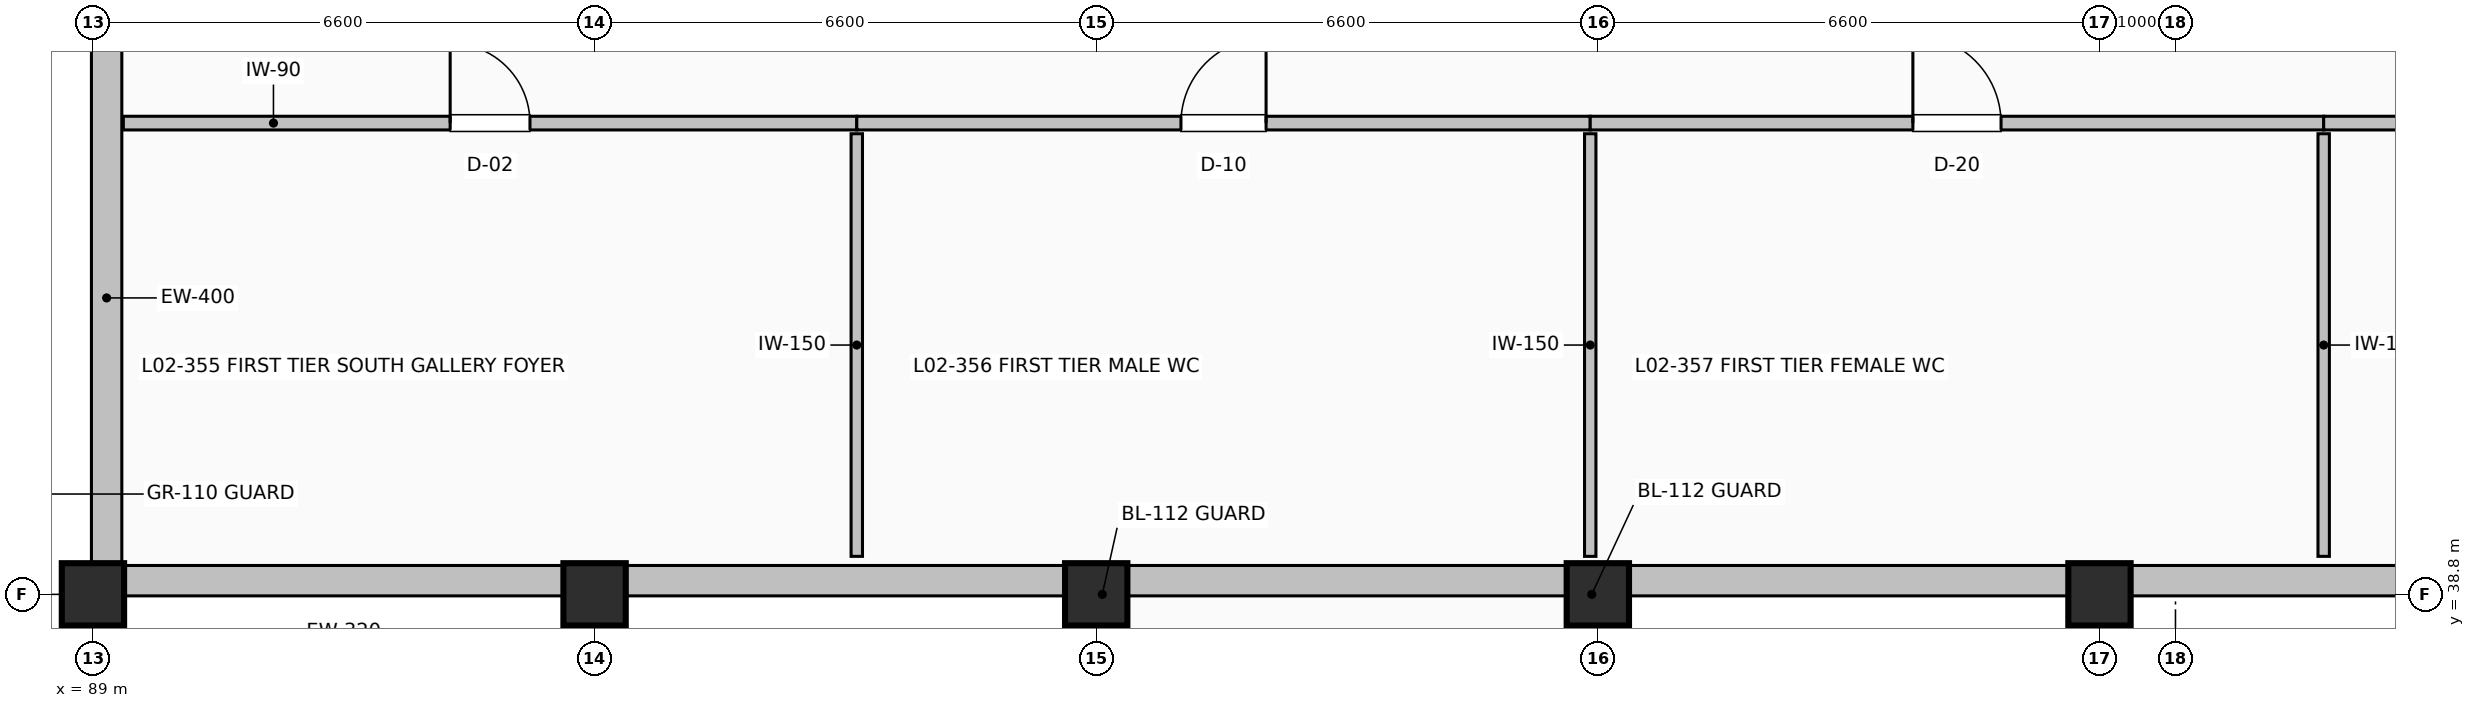
"""IFC4 building model, lengths in metres.
Left out: names, types, materials, properties, quantities, classifications, styles, units other than length and angle.
Written with IfcOpenShell. Run it as: python <this file> out.ifc"""

import sys

from ifc_helpers import new_model, si_unit, direction, frame, frame_2d, origin, origin_2d, place, context, subcontext, project, spatial, rectangle, extrude, element, fill, save


model = new_model("IFC4")
c1 = context("Model", 3, precision=1e-05, world=origin(), true_north=direction((0.0, 1.0)))
c2 = subcontext(c1, "Body", "Model", "MODEL_VIEW")
j1 = project(units=[si_unit("LENGTHUNIT", "METRE"), si_unit("PLANEANGLEUNIT", "RADIAN")], contexts=[c1])
p1 = place(None, origin())
s1 = spatial("IfcSite", under=j1, at=p1, CompositionType="ELEMENT")
p2 = place(p1, origin())
s2 = spatial("IfcBuilding", under=s1, at=p2, CompositionType="ELEMENT")
p3 = place(p2, frame((0.0, 0.0, 10.2)))
s3 = spatial("IfcBuildingStorey", under=s2, at=p3, CompositionType="ELEMENT", Elevation=10.2)
for number, where, z_axis, x_axis in (
    (1, (89.0, 38.8, 0.0), (0.0, 0.0, 1.0), (1.0, 0.0, 0.0)),
    (2, (95.6, 38.8, 0.0), (0.0, 0.0, 1.0), (1.0, 0.0, 0.0)),
    (3, (102.2, 38.8, 0.0), (0.0, 0.0, 1.0), (1.0, 0.0, 0.0)),
    (4, (108.8, 38.8, 0.0), (0.0, 0.0, 1.0), (1.0, 0.0, 0.0)),
    (5, (115.4, 38.8, 0.0), (0.0, 0.0, 1.0), (1.0, 0.0, 0.0)),
):
    element("IfcColumn", number, at=place(p3, frame(where, z_axis=z_axis, x_axis=x_axis)), inside=s3, PredefinedType="COLUMN", context=c2, shape_type="SweptSolid", body=[
        extrude(rectangle(XDim=0.82, YDim=0.82, at=origin_2d()), origin(), (0.0, 0.0, 1.0), 4.8),
    ])
for number, where, z_axis, x_axis in (
    (6, (121.59, 38.98, 0.0), (0.0, 0.0, 1.0), (-1.0, 0.0, 0.0)),
    (7, (114.99, 38.98, 0.0), (0.0, 0.0, 1.0), (-1.0, 0.0, 0.0)),
):
    element("IfcWall", number, at=place(p3, frame(where, z_axis=z_axis, x_axis=x_axis)), inside=s3, PredefinedType="SOLIDWALL", context=c2, shape_type="SweptSolid", body=[
        extrude(rectangle(XDim=5.78, YDim=0.4, at=frame_2d((2.89, 0.0))), origin(), (0.0, 0.0, 1.0), 3.722),
    ])
p4 = place(p3, frame((108.39, 38.98, 0.0), z_axis=(0.0, 0.0, 1.0), x_axis=(-1.0, 0.0, 0.0)))
e8 = element("IfcWall", 8, at=p4, inside=s3, PredefinedType="SOLIDWALL", context=c2, shape_type="SweptSolid", body=[
    extrude(rectangle(XDim=5.78, YDim=0.4, at=frame_2d((2.89, 0.0))), origin(), (0.0, 0.0, 1.0), 3.722),
])
for number, where, z_axis, x_axis in (
    (9, (101.79, 38.98, 0.0), (0.0, 0.0, 1.0), (-1.0, 0.0, 0.0)),
    (10, (95.19, 38.98, 0.0), (0.0, 0.0, 1.0), (-1.0, 0.0, 0.0)),
):
    element("IfcWall", number, at=place(p3, frame(where, z_axis=z_axis, x_axis=x_axis)), inside=s3, PredefinedType="SOLIDWALL", context=c2, shape_type="SweptSolid", body=[
        extrude(rectangle(XDim=5.78, YDim=0.4, at=frame_2d((2.89, 0.0))), origin(), (0.0, 0.0, 1.0), 3.722),
    ])
p5 = place(p3, frame((89.18, 39.21, 0.0), z_axis=(0.0, 0.0, 1.0), x_axis=(0.0, 1.0, 0.0)))
e11 = element("IfcWall", 11, at=p5, inside=s3, PredefinedType="SOLIDWALL", context=c2, shape_type="SweptSolid", body=[
    extrude(rectangle(XDim=6.98, YDim=0.4, at=frame_2d((3.49, 0.0))), origin(), (0.0, 0.0, 1.0), 3.722),
])
p6 = place(p3, frame((89.4, 45.0, 0.0), z_axis=(0.0, 0.0, 1.0), x_axis=(1.0, 0.0, 0.0)))
e12 = element("IfcWall", 12, at=p6, inside=s3, PredefinedType="PARTITIONING", context=c2, shape_type="SweptSolid", body=[
    extrude(rectangle(XDim=9.65, YDim=0.18, at=frame_2d((4.825, 0.0))), origin(), (0.0, 0.0, 1.0), 4.492),
])
p7 = place(p6, frame((4.3, 0.0, 0.0)))
e13 = element("IfcOpeningElement", 13, at=p7, cuts=e12, PredefinedType="OPENING", context=c2, shape_type="SweptSolid", body=[
    extrude(rectangle(XDim=1.05, YDim=2.1, at=frame_2d((0.525, 1.05))), frame((0.0, 0.1, 0.0), z_axis=(0.0, -1.0, 0.0), x_axis=(1.0, 0.0, 0.0)), (0.0, 0.0, 1.0), 0.2),
])
p8 = place(p3, frame((99.05, 39.3, 0.0), z_axis=(0.0, 0.0, 1.0), x_axis=(0.0, 1.0, 0.0)))
e14 = element("IfcWall", 14, at=p8, inside=s3, PredefinedType="PARTITIONING", context=c2, shape_type="SweptSolid", body=[
    extrude(rectangle(XDim=5.56, YDim=0.15, at=frame_2d((2.78, 0.0))), origin(), (0.0, 0.0, 1.0), 4.492),
])
p9 = place(p3, frame((99.05, 45.0, 0.0), z_axis=(0.0, 0.0, 1.0), x_axis=(1.0, 0.0, 0.0)))
e15 = element("IfcWall", 15, at=p9, inside=s3, PredefinedType="PARTITIONING", context=c2, shape_type="SweptSolid", body=[
    extrude(rectangle(XDim=9.65, YDim=0.18, at=frame_2d((4.825, 0.0))), origin(), (0.0, 0.0, 1.0), 4.492),
])
p10 = place(p9, frame((4.265, 0.0, 0.0)))
e16 = element("IfcOpeningElement", 16, at=p10, cuts=e15, PredefinedType="OPENING", context=c2, shape_type="SweptSolid", body=[
    extrude(rectangle(XDim=1.12, YDim=2.12, at=frame_2d((0.56, 1.06))), frame((0.0, 0.1, 0.0), z_axis=(0.0, -1.0, 0.0), x_axis=(1.0, 0.0, 0.0)), (0.0, 0.0, 1.0), 0.2),
])
p11 = place(p3, frame((108.7, 39.3, 0.0), z_axis=(0.0, 0.0, 1.0), x_axis=(0.0, 1.0, 0.0)))
e17 = element("IfcWall", 17, at=p11, inside=s3, PredefinedType="PARTITIONING", context=c2, shape_type="SweptSolid", body=[
    extrude(rectangle(XDim=5.56, YDim=0.15, at=frame_2d((2.78, 0.0))), origin(), (0.0, 0.0, 1.0), 3.622),
])
p12 = place(p3, frame((108.7, 45.0, 0.0), z_axis=(0.0, 0.0, 1.0), x_axis=(1.0, 0.0, 0.0)))
e18 = element("IfcWall", 18, at=p12, inside=s3, PredefinedType="PARTITIONING", context=c2, shape_type="SweptSolid", body=[
    extrude(rectangle(XDim=9.65, YDim=0.18, at=frame_2d((4.825, 0.0))), origin(), (0.0, 0.0, 1.0), 4.492),
])
p13 = place(p12, frame((4.245, 0.0, 0.0)))
e19 = element("IfcOpeningElement", 19, at=p13, cuts=e18, PredefinedType="OPENING", context=c2, shape_type="SweptSolid", body=[
    extrude(rectangle(XDim=1.16, YDim=2.1, at=frame_2d((0.58, 1.05))), frame((0.0, 0.1, 0.0), z_axis=(0.0, -1.0, 0.0), x_axis=(1.0, 0.0, 0.0)), (0.0, 0.0, 1.0), 0.2),
])
p14 = place(p3, frame((118.35, 39.3, 0.0), z_axis=(0.0, 0.0, 1.0), x_axis=(0.0, 1.0, 0.0)))
e20 = element("IfcWall", 20, at=p14, inside=s3, PredefinedType="PARTITIONING", context=c2, shape_type="SweptSolid", body=[
    extrude(rectangle(XDim=5.56, YDim=0.15, at=frame_2d((2.78, 0.0))), origin(), (0.0, 0.0, 1.0), 4.492),
])
p15 = place(p3, frame((118.35, 45.0, 0.0), z_axis=(0.0, 0.0, 1.0), x_axis=(1.0, 0.0, 0.0)))
e21 = element("IfcWall", 21, at=p15, inside=s3, PredefinedType="PARTITIONING", context=c2, shape_type="SweptSolid", body=[
    extrude(rectangle(XDim=9.65, YDim=0.18, at=frame_2d((4.825, 0.0))), origin(), (0.0, 0.0, 1.0), 4.492),
])
p16 = place(p15, frame((4.265, 0.0, 0.0)))
e22 = element("IfcOpeningElement", 22, at=p16, cuts=e21, PredefinedType="OPENING", context=c2, shape_type="SweptSolid", body=[
    extrude(rectangle(XDim=1.12, YDim=2.12, at=frame_2d((0.56, 1.06))), frame((0.0, 0.1, 0.0), z_axis=(0.0, -1.0, 0.0), x_axis=(1.0, 0.0, 0.0)), (0.0, 0.0, 1.0), 0.2),
])
p17 = place(p7, origin())
e23 = element("IfcDoor", 23, at=p17, inside=s3, OperationType="SINGLE_SWING_LEFT", PredefinedType="DOOR", context=c2, shape_type="SweptSolid", body=[
    extrude(rectangle(XDim=1.05, YDim=2.1, at=frame_2d((0.525, 1.05))), frame((0.0, 0.025, 0.0), z_axis=(0.0, -1.0, 0.0), x_axis=(1.0, 0.0, 0.0)), (0.0, 0.0, 1.0), 0.05),
])
fill(e13, e23)
p18 = place(p10, origin())
e24 = element("IfcDoor", 24, at=p18, inside=s3, OperationType="SINGLE_SWING_RIGHT", PredefinedType="DOOR", context=c2, shape_type="SweptSolid", body=[
    extrude(rectangle(XDim=1.12, YDim=2.12, at=frame_2d((0.56, 1.06))), frame((0.0, 0.025, 0.0), z_axis=(0.0, -1.0, 0.0), x_axis=(1.0, 0.0, 0.0)), (0.0, 0.0, 1.0), 0.05),
])
fill(e16, e24)
p19 = place(p13, origin())
e25 = element("IfcDoor", 25, at=p19, inside=s3, OperationType="SINGLE_SWING_LEFT", PredefinedType="DOOR", context=c2, shape_type="SweptSolid", body=[
    extrude(rectangle(XDim=1.16, YDim=2.1, at=frame_2d((0.58, 1.05))), frame((0.0, 0.025, 0.0), z_axis=(0.0, -1.0, 0.0), x_axis=(1.0, 0.0, 0.0)), (0.0, 0.0, 1.0), 0.05),
])
fill(e19, e25)
save(model, sys.argv[1])
